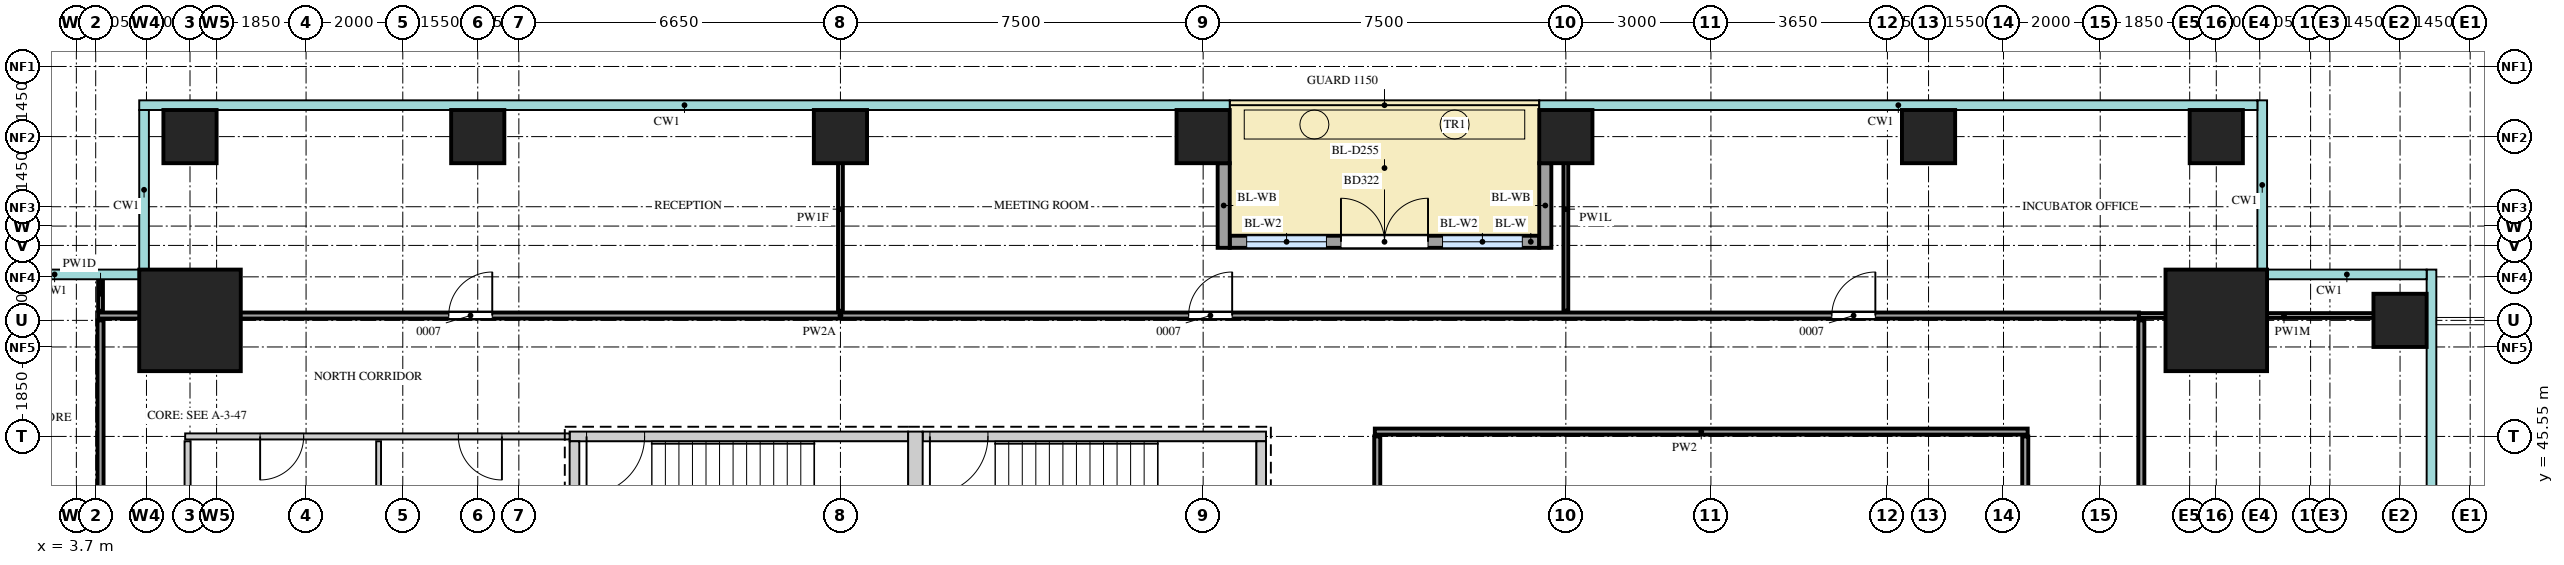
"""IFC4 building model, lengths in metres.
Left out: names, types, materials, properties, quantities, classifications, styles, units other than length and angle.
Written with IfcOpenShell. Run it as: python <this file> out.ifc"""

import sys

from ifc_helpers import new_model, si_unit, direction, frame, frame_2d, origin, origin_2d, place, context, subcontext, project, spatial, rectangle, extrude, source, transform, mapped, element, fill, save


model = new_model("IFC4")
c1 = context("Model", 3, precision=1e-05, world=origin(), true_north=direction((0.0, 1.0)))
c2 = subcontext(c1, "Body", "Model", "MODEL_VIEW")
j1 = project(units=[si_unit("LENGTHUNIT", "METRE"), si_unit("PLANEANGLEUNIT", "RADIAN")], contexts=[c1])
p1 = place(None, origin())
s1 = spatial("IfcSite", under=j1, at=p1, CompositionType="ELEMENT")
p2 = place(p1, origin())
s2 = spatial("IfcBuilding", under=s1, at=p2, CompositionType="ELEMENT")
p3 = place(p2, frame((0.0, 0.0, 149.9)))
s3 = spatial("IfcBuildingStorey", under=s2, at=p3, CompositionType="ELEMENT", Elevation=149.9)
m1 = source(origin(), c2, "Body", "SweptSolid", [
    extrude(rectangle(XDim=7.0, YDim=0.2, at=frame_2d((3.5, 0.0))), origin(), (0.0, 0.0, 1.0), 4.1),
])
p4 = place(p3, frame((13.9, 45.55, 0.0), z_axis=(0.0, 0.0, 1.0), x_axis=(1.0, 0.0, 0.0)))
e1 = element("IfcWall", 1, at=p4, inside=s3, PredefinedType="SHEAR", context=c2, shape_type="MappedRepresentation", body=[
    mapped(m1, transform((0.0, 0.0, 0.0))),
])
m2 = source(origin(), c2, "Body", "SweptSolid", [
    extrude(rectangle(XDim=1.2, YDim=2.1, at=frame_2d((0.6, 1.05))), frame((0.0, 0.11, 0.0), z_axis=(0.0, -1.0, 0.0), x_axis=(1.0, 0.0, 0.0)), (0.0, 0.0, 1.0), 0.22),
])
p5 = place(p4, frame((0.35, 0.0, 0.0)))
e2 = element("IfcOpeningElement", 2, at=p5, cuts=e1, PredefinedType="OPENING", context=c2, shape_type="MappedRepresentation", body=[
    mapped(m2, transform((0.0, 0.0, 0.0))),
])
m3 = source(origin(), c2, "Body", "SweptSolid", [
    extrude(rectangle(XDim=7.1, YDim=0.2, at=frame_2d((3.55, 0.0))), origin(), (0.0, 0.0, 1.0), 4.1),
])
p6 = place(p3, frame((21.2, 45.55, 0.0), z_axis=(0.0, 0.0, 1.0), x_axis=(1.0, 0.0, 0.0)))
e3 = element("IfcWall", 3, at=p6, inside=s3, PredefinedType="SHEAR", context=c2, shape_type="MappedRepresentation", body=[
    mapped(m3, transform((0.0, 0.0, 0.0))),
])
p7 = place(p6, frame((0.15, 0.0, 0.0)))
e4 = element("IfcOpeningElement", 4, at=p7, cuts=e3, PredefinedType="OPENING", context=c2, shape_type="MappedRepresentation", body=[
    mapped(m2, transform((0.0, 0.0, 0.0))),
])
m4 = source(origin(), c2, "Body", "SweptSolid", [
    extrude(rectangle(XDim=3.75, YDim=0.3, at=frame_2d((1.875, 0.0))), origin(), (0.0, 0.0, 1.0), 4.1),
])
p8 = place(p3, frame((21.05, 41.9, 0.0), z_axis=(0.0, 0.0, 1.0), x_axis=(0.0, 1.0, 0.0)))
e5 = element("IfcWall", 5, at=p8, inside=s3, PredefinedType="SHEAR", context=c2, shape_type="MappedRepresentation", body=[
    mapped(m4, transform((0.0, 0.0, 0.0))),
])
m5 = source(origin(), c2, "Body", "SweptSolid", [
    extrude(rectangle(XDim=3.35, YDim=0.2, at=frame_2d((1.675, 0.0))), origin(), (0.0, 0.0, 1.0), 4.1),
])
for number, where, z_axis, x_axis in (
    (6, (14.0, 42.1, 0.0), (0.0, 0.0, 1.0), (0.0, 1.0, 0.0)),
    (7, (28.2, 42.1, 0.0), (0.0, 0.0, 1.0), (0.0, 1.0, 0.0)),
):
    element("IfcWall", number, at=place(p3, frame(where, z_axis=z_axis, x_axis=x_axis)), inside=s3, PredefinedType="SHEAR", context=c2, shape_type="MappedRepresentation", body=[
        mapped(m5, transform((0.0, 0.0, 0.0))),
    ])
m6 = source(origin(), c2, "Body", "SweptSolid", [
    extrude(rectangle(XDim=2.1, YDim=2.1, at=origin_2d()), origin(), (0.0, 0.0, 1.0), 4.4),
])
for number, where, z_axis, x_axis in (
    (8, (47.95, 47.95, 0.0), (0.0, 0.0, 1.0), (1.0, 0.0, 0.0)),
    (9, (6.05, 47.95, 0.0), (0.0, 0.0, 1.0), (1.0, 0.0, 0.0)),
):
    element("IfcColumn", number, at=place(p3, frame(where, z_axis=z_axis, x_axis=x_axis)), inside=s3, PredefinedType="COLUMN", context=c2, shape_type="MappedRepresentation", body=[
        mapped(m6, transform((0.0, 0.0, 0.0))),
    ])
m7 = source(origin(), c2, "Body", "SweptSolid", [
    extrude(rectangle(XDim=1.1, YDim=1.1, at=origin_2d()), origin(), (0.0, 0.0, 1.0), 4.1),
])
for number, where, z_axis, x_axis in (
    (10, (51.75, 47.95, 0.0), (0.0, 0.0, 1.0), (1.0, 0.0, 0.0)),
    (11, (6.05, 51.75, 0.0), (0.0, 0.0, 1.0), (1.0, 0.0, 0.0)),
    (12, (12.0, 51.75, 0.0), (0.0, 0.0, 1.0), (1.0, 0.0, 0.0)),
    (13, (19.5, 51.75, 0.0), (0.0, 0.0, 1.0), (1.0, 0.0, 0.0)),
    (14, (27.0, 51.75, 0.0), (0.0, 0.0, 1.0), (1.0, 0.0, 0.0)),
    (15, (34.5, 51.75, 0.0), (0.0, 0.0, 1.0), (1.0, 0.0, 0.0)),
    (16, (42.0, 51.75, 0.0), (0.0, 0.0, 1.0), (1.0, 0.0, 0.0)),
    (17, (47.95, 51.75, 0.0), (0.0, 0.0, 1.0), (1.0, 0.0, 0.0)),
):
    element("IfcColumn", number, at=place(p3, frame(where, z_axis=z_axis, x_axis=x_axis)), inside=s3, PredefinedType="COLUMN", context=c2, shape_type="MappedRepresentation", body=[
        mapped(m7, transform((0.0, 0.0, 0.0))),
    ])
m8 = source(origin(), c2, "Body", "SweptSolid", [
    extrude(rectangle(XDim=6.4, YDim=0.25, at=frame_2d((3.2, 0.0))), origin(), (0.0, 0.0, 1.0), 4.1),
])
p9 = place(p3, frame((27.55, 49.575, 0.0), z_axis=(0.0, 0.0, 1.0), x_axis=(1.0, 0.0, 0.0)))
e18 = element("IfcWall", 18, at=p9, inside=s3, PredefinedType="SOLIDWALL", context=c2, shape_type="MappedRepresentation", body=[
    mapped(m8, transform((0.0, 0.0, 0.0))),
])
m9 = source(origin(), c2, "Body", "SweptSolid", [
    extrude(rectangle(XDim=1.65, YDim=2.4, at=frame_2d((0.825, 1.2))), frame((0.0, 0.135, 0.0), z_axis=(0.0, -1.0, 0.0), x_axis=(1.0, 0.0, 0.0)), (0.0, 0.0, 1.0), 0.27),
])
p10 = place(p9, frame((0.35, 0.0, 0.0)))
e19 = element("IfcOpeningElement", 19, at=p10, cuts=e18, PredefinedType="OPENING", context=c2, shape_type="MappedRepresentation", body=[
    mapped(m9, transform((0.0, 0.0, 0.0))),
])
p11 = place(p9, frame((4.4, 0.0, 0.0)))
e20 = element("IfcOpeningElement", 20, at=p11, cuts=e18, PredefinedType="OPENING", context=c2, shape_type="MappedRepresentation", body=[
    mapped(m9, transform((0.0, 0.0, 0.0))),
])
m10 = source(origin(), c2, "Body", "SweptSolid", [
    extrude(rectangle(XDim=1.8, YDim=2.4, at=frame_2d((0.9, 1.2))), frame((0.0, 0.135, 0.0), z_axis=(0.0, -1.0, 0.0), x_axis=(1.0, 0.0, 0.0)), (0.0, 0.0, 1.0), 0.27),
])
p12 = place(p9, frame((2.3, 0.0, 0.0)))
e21 = element("IfcOpeningElement", 21, at=p12, cuts=e18, PredefinedType="OPENING", context=c2, shape_type="MappedRepresentation", body=[
    mapped(m10, transform((0.0, 0.0, 0.0))),
])
m11 = source(origin(), c2, "Body", "SweptSolid", [
    extrude(rectangle(XDim=1.75, YDim=0.25, at=frame_2d((0.875, 0.0))), origin(), (0.0, 0.0, 1.0), 3.8),
])
for number, where, z_axis, x_axis in (
    (22, (27.425, 51.2, 0.0), (0.0, 0.0, 1.0), (0.0, -1.0, 0.0)),
    (23, (34.075, 51.2, 0.0), (0.0, 0.0, 1.0), (0.0, -1.0, 0.0)),
):
    element("IfcWall", number, at=place(p3, frame(where, z_axis=z_axis, x_axis=x_axis)), inside=s3, PredefinedType="SOLIDWALL", context=c2, shape_type="MappedRepresentation", body=[
        mapped(m11, transform((0.0, 0.0, 0.0))),
    ])
m12 = source(origin(), c2, "Body", "SweptSolid", [
    extrude(rectangle(XDim=37.65, YDim=0.125, at=frame_2d((18.825, 0.0))), origin(), (0.0, 0.0, 1.0), 4.2),
])
p13 = place(p3, frame((46.4, 10.3, 0.0), z_axis=(0.0, 0.0, 1.0), x_axis=(0.0, 1.0, 0.0)))
e24 = element("IfcWall", 24, at=p13, inside=s3, PredefinedType="PARTITIONING", context=c2, shape_type="MappedRepresentation", body=[
    mapped(m12, transform((0.0, 0.0, 0.0))),
])
m13 = source(origin(), c2, "Body", "SweptSolid", [
    extrude(rectangle(XDim=0.9, YDim=2.1, at=frame_2d((0.45, 1.05))), frame((0.0, 0.073, 0.0), z_axis=(0.0, -1.0, 0.0), x_axis=(1.0, 0.0, 0.0)), (0.0, 0.0, 1.0), 0.145),
])
p14 = place(p13, frame((7.85, 0.0, 0.0)))
e25 = element("IfcOpeningElement", 25, at=p14, cuts=e24, PredefinedType="OPENING", context=c2, shape_type="MappedRepresentation", body=[
    mapped(m13, transform((0.0, 0.0, 0.0))),
])
m14 = source(origin(), c2, "Body", "SweptSolid", [
    extrude(rectangle(XDim=1.2, YDim=2.1, at=frame_2d((0.6, 1.05))), frame((0.0, 0.073, 0.0), z_axis=(0.0, -1.0, 0.0), x_axis=(1.0, 0.0, 0.0)), (0.0, 0.0, 1.0), 0.145),
])
p15 = place(p13, frame((25.4, 0.0, 0.0)))
e26 = element("IfcOpeningElement", 26, at=p15, cuts=e24, PredefinedType="OPENING", context=c2, shape_type="MappedRepresentation", body=[
    mapped(m14, transform((0.0, 0.0, 0.0))),
])
m15 = source(origin(), c2, "Body", "SweptSolid", [
    extrude(rectangle(XDim=32.85, YDim=0.125, at=frame_2d((16.425, 0.0))), origin(), (0.0, 0.0, 1.0), 4.2),
])
p16 = place(p3, frame((44.0, 12.7, 0.0), z_axis=(0.0, 0.0, 1.0), x_axis=(0.0, 1.0, 0.0)))
e27 = element("IfcWall", 27, at=p16, inside=s3, PredefinedType="PARTITIONING", context=c2, shape_type="MappedRepresentation", body=[
    mapped(m15, transform((0.0, 0.0, 0.0))),
])
p17 = place(p16, frame((18.2, 0.0, 0.0)))
e28 = element("IfcOpeningElement", 28, at=p17, cuts=e27, PredefinedType="OPENING", context=c2, shape_type="MappedRepresentation", body=[
    mapped(m14, transform((0.0, 0.0, 0.0))),
])
p18 = place(p16, frame((27.5, 0.0, 0.0)))
e29 = element("IfcOpeningElement", 29, at=p18, cuts=e27, PredefinedType="OPENING", context=c2, shape_type="MappedRepresentation", body=[
    mapped(m14, transform((0.0, 0.0, 0.0))),
])
m16 = source(origin(), c2, "Body", "SweptSolid", [
    extrude(rectangle(XDim=28.75, YDim=0.125, at=frame_2d((14.375, 0.0))), origin(), (0.0, 0.0, 1.0), 4.2),
])
p19 = place(p3, frame((4.2, 19.2, 0.0), z_axis=(0.0, 0.0, 1.0), x_axis=(0.0, 1.0, 0.0)))
e30 = element("IfcWall", 30, at=p19, inside=s3, PredefinedType="PARTITIONING", context=c2, shape_type="MappedRepresentation", body=[
    mapped(m16, transform((0.0, 0.0, 0.0))),
])
p20 = place(p19, frame((5.95, 0.0, 0.0)))
e31 = element("IfcOpeningElement", 31, at=p20, cuts=e30, PredefinedType="OPENING", context=c2, shape_type="MappedRepresentation", body=[
    mapped(m13, transform((0.0, 0.0, 0.0))),
])
p21 = place(p19, frame((20.25, 0.0, 0.0)))
e32 = element("IfcOpeningElement", 32, at=p21, cuts=e30, PredefinedType="OPENING", context=c2, shape_type="MappedRepresentation", body=[
    mapped(m13, transform((0.0, 0.0, 0.0))),
])
m17 = source(origin(), c2, "Body", "SweptSolid", [
    extrude(rectangle(XDim=9.45, YDim=0.125, at=frame_2d((4.725, 0.0))), origin(), (0.0, 0.0, 1.0), 4.2),
])
p22 = place(p3, frame((30.6, 36.1, 0.0), z_axis=(0.0, 0.0, 1.0), x_axis=(0.0, 1.0, 0.0)))
e33 = element("IfcWall", 33, at=p22, inside=s3, PredefinedType="PARTITIONING", context=c2, shape_type="MappedRepresentation", body=[
    mapped(m17, transform((0.0, 0.0, 0.0))),
])
m18 = source(origin(), c2, "Body", "SweptSolid", [
    extrude(rectangle(XDim=3.45, YDim=0.125, at=frame_2d((1.725, 0.0))), origin(), (0.0, 0.0, 1.0), 4.2),
])
p23 = place(p3, frame((6.0, 42.0, 0.0), z_axis=(0.0, 0.0, 1.0), x_axis=(0.0, 1.0, 0.0)))
e34 = element("IfcWall", 34, at=p23, inside=s3, PredefinedType="PARTITIONING", context=c2, shape_type="MappedRepresentation", body=[
    mapped(m18, transform((0.0, 0.0, 0.0))),
])
m19 = source(origin(), c2, "Body", "SweptSolid", [
    extrude(rectangle(XDim=3.45, YDim=0.1, at=frame_2d((1.725, 0.0))), origin(), (0.0, 0.0, 1.0), 4.2),
])
p24 = place(p3, frame((9.95, 42.0, 0.0), z_axis=(0.0, 0.0, 1.0), x_axis=(0.0, 1.0, 0.0)))
e35 = element("IfcWall", 35, at=p24, inside=s3, PredefinedType="PARTITIONING", context=c2, shape_type="MappedRepresentation", body=[
    mapped(m19, transform((0.0, 0.0, 0.0))),
])
m20 = source(origin(), c2, "Body", "SweptSolid", [
    extrude(rectangle(XDim=7.95, YDim=0.125, at=frame_2d((3.975, 0.0))), origin(), (0.0, 0.0, 1.0), 4.2),
])
p25 = place(p3, frame((5.95, 45.55, 0.0), z_axis=(0.0, 0.0, 1.0), x_axis=(1.0, 0.0, 0.0)))
e36 = element("IfcWall", 36, at=p25, inside=s3, PredefinedType="PARTITIONING", context=c2, shape_type="MappedRepresentation", body=[
    mapped(m20, transform((0.0, 0.0, 0.0))),
])
p26 = place(p25, frame((1.55, 0.0, 0.0)))
e37 = element("IfcOpeningElement", 37, at=p26, cuts=e36, PredefinedType="OPENING", context=c2, shape_type="MappedRepresentation", body=[
    mapped(m13, transform((0.0, 0.0, 0.0))),
])
p27 = place(p25, frame((5.65, 0.0, 0.0)))
e38 = element("IfcOpeningElement", 38, at=p27, cuts=e36, PredefinedType="OPENING", context=c2, shape_type="MappedRepresentation", body=[
    mapped(m13, transform((0.0, 0.0, 0.0))),
])
m21 = source(origin(), c2, "Body", "SweptSolid", [
    extrude(rectangle(XDim=13.5, YDim=0.125, at=frame_2d((6.75, 0.0))), origin(), (0.0, 0.0, 1.0), 4.2),
])
p28 = place(p3, frame((30.55, 45.65, 0.0), z_axis=(0.0, 0.0, 1.0), x_axis=(1.0, 0.0, 0.0)))
e39 = element("IfcWall", 39, at=p28, inside=s3, PredefinedType="PARTITIONING", context=c2, shape_type="MappedRepresentation", body=[
    mapped(m21, transform((0.0, 0.0, 0.0))),
])
m22 = source(origin(), c2, "Body", "SweptSolid", [
    extrude(rectangle(XDim=42.2, YDim=0.125, at=frame_2d((21.1, 0.0))), origin(), (0.0, 0.0, 1.0), 3.55),
])
p29 = place(p3, frame((4.15, 48.05, 0.0), z_axis=(0.0, 0.0, 1.0), x_axis=(1.0, 0.0, 0.0)))
e40 = element("IfcWall", 40, at=p29, inside=s3, PredefinedType="PARTITIONING", context=c2, shape_type="MappedRepresentation", body=[
    mapped(m22, transform((0.0, 0.0, 0.0))),
])
p30 = place(p29, frame((7.25, 0.0, 0.0)))
e41 = element("IfcOpeningElement", 41, at=p30, cuts=e40, PredefinedType="OPENING", context=c2, shape_type="MappedRepresentation", body=[
    mapped(m13, transform((0.0, 0.0, 0.0))),
])
p31 = place(p29, frame((22.55, 0.0, 0.0)))
e42 = element("IfcOpeningElement", 42, at=p31, cuts=e40, PredefinedType="OPENING", context=c2, shape_type="MappedRepresentation", body=[
    mapped(m13, transform((0.0, 0.0, 0.0))),
])
p32 = place(p29, frame((35.85, 0.0, 0.0)))
e43 = element("IfcOpeningElement", 43, at=p32, cuts=e40, PredefinedType="OPENING", context=c2, shape_type="MappedRepresentation", body=[
    mapped(m13, transform((0.0, 0.0, 0.0))),
])
m23 = source(origin(), c2, "Body", "SweptSolid", [
    extrude(rectangle(XDim=6.0, YDim=0.1, at=frame_2d((3.0, 0.0))), origin(), (0.0, 0.0, 1.0), 3.55),
])
p33 = place(p3, frame((46.35, 48.05, 0.0), z_axis=(0.0, 0.0, 1.0), x_axis=(1.0, 0.0, 0.0)))
e44 = element("IfcWall", 44, at=p33, inside=s3, PredefinedType="PARTITIONING", context=c2, shape_type="MappedRepresentation", body=[
    mapped(m23, transform((0.0, 0.0, 0.0))),
])
m24 = source(origin(), c2, "Body", "SweptSolid", [
    extrude(rectangle(XDim=0.7, YDim=0.1, at=frame_2d((0.35, 0.0))), origin(), (0.0, 0.0, 1.0), 4.2),
])
p34 = place(p3, frame((4.2, 48.15, 0.0), z_axis=(0.0, 0.0, 1.0), x_axis=(0.0, 1.0, 0.0)))
e45 = element("IfcWall", 45, at=p34, inside=s3, PredefinedType="PARTITIONING", context=c2, shape_type="MappedRepresentation", body=[
    mapped(m24, transform((0.0, 0.0, 0.0))),
])
m25 = source(origin(), c2, "Body", "SweptSolid", [
    extrude(rectangle(XDim=4.2, YDim=0.1, at=frame_2d((2.1, 0.0))), origin(), (0.0, 0.0, 1.0), 3.77),
])
p35 = place(p3, frame((19.5, 48.15, 0.0), z_axis=(0.0, 0.0, 1.0), x_axis=(0.0, 1.0, 0.0)))
e46 = element("IfcWall", 46, at=p35, inside=s3, PredefinedType="PARTITIONING", context=c2, shape_type="MappedRepresentation", body=[
    mapped(m25, transform((0.0, 0.0, 0.0))),
])
m26 = source(origin(), c2, "Body", "SweptSolid", [
    extrude(rectangle(XDim=4.2, YDim=0.1, at=frame_2d((2.1, 0.0))), origin(), (0.0, 0.0, 1.0), 3.6),
])
p36 = place(p3, frame((34.5, 48.15, 0.0), z_axis=(0.0, 0.0, 1.0), x_axis=(0.0, 1.0, 0.0)))
e47 = element("IfcWall", 47, at=p36, inside=s3, PredefinedType="PARTITIONING", context=c2, shape_type="MappedRepresentation", body=[
    mapped(m26, transform((0.0, 0.0, 0.0))),
])
m27 = source(origin(), c2, "Body", "SweptSolid", [
    extrude(rectangle(XDim=1.65, YDim=2.4, at=frame_2d((0.825, 1.2))), frame((0.0, 0.03, 0.0), z_axis=(0.0, -1.0, 0.0), x_axis=(1.0, 0.0, 0.0)), (0.0, 0.0, 1.0), 0.06),
])
p37 = place(p10, origin())
e48 = element("IfcWindow", 48, at=p37, inside=s3, PartitioningType="SINGLE_PANEL", PredefinedType="WINDOW", context=c2, shape_type="MappedRepresentation", body=[
    mapped(m27, transform((0.0, 0.0, 0.0))),
])
fill(e19, e48)
p38 = place(p11, origin())
e49 = element("IfcWindow", 49, at=p38, inside=s3, PartitioningType="SINGLE_PANEL", PredefinedType="WINDOW", context=c2, shape_type="MappedRepresentation", body=[
    mapped(m27, transform((0.0, 0.0, 0.0))),
])
fill(e20, e49)
m28 = source(origin(), c2, "Body", "SweptSolid", [
    extrude(rectangle(XDim=1.8, YDim=2.4, at=frame_2d((0.9, 1.2))), frame((0.0, 0.025, 0.0), z_axis=(0.0, -1.0, 0.0), x_axis=(1.0, 0.0, 0.0)), (0.0, 0.0, 1.0), 0.05),
])
p39 = place(p12, origin())
e50 = element("IfcDoor", 50, at=p39, inside=s3, OperationType="DOUBLE_DOOR_DOUBLE_SWING", PredefinedType="DOOR", context=c2, shape_type="MappedRepresentation", body=[
    mapped(m28, transform((0.0, 0.0, 0.0))),
])
fill(e21, e50)
m29 = source(origin(), c2, "Body", "SweptSolid", [
    extrude(rectangle(XDim=0.9, YDim=2.1, at=frame_2d((0.45, 1.05))), frame((0.0, 0.025, 0.0), z_axis=(0.0, -1.0, 0.0), x_axis=(1.0, 0.0, 0.0)), (0.0, 0.0, 1.0), 0.05),
])
p40 = place(p30, origin())
e51 = element("IfcDoor", 51, at=p40, inside=s3, OperationType="SINGLE_SWING_LEFT", PredefinedType="DOOR", context=c2, shape_type="MappedRepresentation", body=[
    mapped(m29, transform((0.0, 0.0, 0.0))),
])
fill(e41, e51)
p41 = place(p31, origin())
e52 = element("IfcDoor", 52, at=p41, inside=s3, OperationType="SINGLE_SWING_LEFT", PredefinedType="DOOR", context=c2, shape_type="MappedRepresentation", body=[
    mapped(m29, transform((0.0, 0.0, 0.0))),
])
fill(e42, e52)
p42 = place(p32, origin())
e53 = element("IfcDoor", 53, at=p42, inside=s3, OperationType="SINGLE_SWING_LEFT", PredefinedType="DOOR", context=c2, shape_type="MappedRepresentation", body=[
    mapped(m29, transform((0.0, 0.0, 0.0))),
])
fill(e43, e53)
p43 = place(p26, origin())
e54 = element("IfcDoor", 54, at=p43, inside=s3, OperationType="SINGLE_SWING_LEFT", PredefinedType="DOOR", context=c2, shape_type="MappedRepresentation", body=[
    mapped(m29, transform((0.0, 0.0, 0.0))),
])
fill(e37, e54)
p44 = place(p27, origin())
e55 = element("IfcDoor", 55, at=p44, inside=s3, OperationType="SINGLE_SWING_RIGHT", PredefinedType="DOOR", context=c2, shape_type="MappedRepresentation", body=[
    mapped(m29, transform((0.0, 0.0, 0.0))),
])
fill(e38, e55)
m30 = source(origin(), c2, "Body", "SweptSolid", [
    extrude(rectangle(XDim=1.2, YDim=2.1, at=frame_2d((0.6, 1.05))), frame((0.0, 0.025, 0.0), z_axis=(0.0, -1.0, 0.0), x_axis=(1.0, 0.0, 0.0)), (0.0, 0.0, 1.0), 0.05),
])
p45 = place(p5, origin())
e56 = element("IfcDoor", 56, at=p45, inside=s3, OperationType="SINGLE_SWING_LEFT", PredefinedType="DOOR", context=c2, shape_type="MappedRepresentation", body=[
    mapped(m30, transform((0.0, 0.0, 0.0))),
])
fill(e2, e56)
p46 = place(p7, origin())
e57 = element("IfcDoor", 57, at=p46, inside=s3, OperationType="SINGLE_SWING_LEFT", PredefinedType="DOOR", context=c2, shape_type="MappedRepresentation", body=[
    mapped(m30, transform((0.0, 0.0, 0.0))),
])
fill(e4, e57)
save(model, sys.argv[1])
